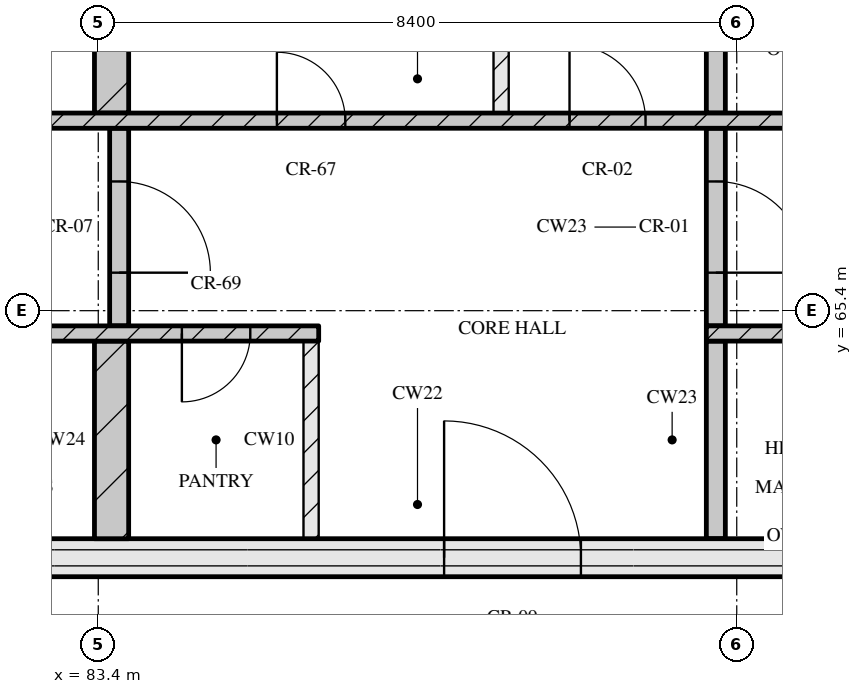
"""IFC4 building model, lengths in metres.
Left out: names, types, materials, properties, quantities, classifications, styles, units other than length and angle.
Written with IfcOpenShell. Run it as: python <this file> out.ifc"""

import sys

from ifc_helpers import new_model, si_unit, direction, frame, frame_2d, origin, place, context, subcontext, project, spatial, rectangle, extrude, element, fill, save


model = new_model("IFC4")
c1 = context("Model", 3, precision=1e-05, world=origin(), true_north=direction((0.0, 1.0)))
c2 = subcontext(c1, "Body", "Model", "MODEL_VIEW")
j1 = project(units=[si_unit("LENGTHUNIT", "METRE"), si_unit("PLANEANGLEUNIT", "RADIAN")], contexts=[c1])
p1 = place(None, origin())
s1 = spatial("IfcSite", under=j1, at=p1, CompositionType="ELEMENT")
p2 = place(p1, origin())
s2 = spatial("IfcBuilding", under=s1, at=p2, CompositionType="ELEMENT")
p3 = place(p2, frame((0.0, 0.0, 310.35)))
s3 = spatial("IfcBuildingStorey", under=s2, at=p3, CompositionType="ELEMENT", Elevation=310.35)
p4 = place(p3, frame((67.3, 62.15, 0.0), z_axis=(0.0, 0.0, 1.0), x_axis=(1.0, 0.0, 0.0)))
e1 = element("IfcWall", 1, at=p4, inside=s3, PredefinedType="SOLIDWALL", context=c2, shape_type="SweptSolid", body=[
    extrude(rectangle(XDim=40.6, YDim=0.5, at=frame_2d((20.3, 0.0))), origin(), (0.0, 0.0, 1.0), 4.2),
])
p5 = place(p4, frame((20.65, 0.0, 0.0)))
e2 = element("IfcOpeningElement", 2, at=p5, cuts=e1, PredefinedType="OPENING", context=c2, shape_type="SweptSolid", body=[
    extrude(rectangle(XDim=1.8, YDim=2.1, at=frame_2d((0.9, 1.05))), frame((0.0, 0.26, 0.0), z_axis=(0.0, -1.0, 0.0), x_axis=(1.0, 0.0, 0.0)), (0.0, 0.0, 1.0), 0.52),
])
p6 = place(p3, frame((83.575, 62.4, 0.0), z_axis=(0.0, 0.0, 1.0), x_axis=(0.0, 1.0, 0.0)))
e3 = element("IfcWall", 3, at=p6, inside=s3, PredefinedType="SOLIDWALL", context=c2, shape_type="SweptSolid", body=[
    extrude(rectangle(XDim=2.6, YDim=0.45, at=frame_2d((1.3, 0.0))), origin(), (0.0, 0.0, 1.0), 4.2),
])
p7 = place(p3, frame((86.2, 62.4, 0.0), z_axis=(0.0, 0.0, 1.0), x_axis=(0.0, 1.0, 0.0)))
e4 = element("IfcWall", 4, at=p7, inside=s3, PredefinedType="PARTITIONING", context=c2, shape_type="SweptSolid", body=[
    extrude(rectangle(XDim=2.6, YDim=0.2, at=frame_2d((1.3, 0.0))), origin(), (0.0, 0.0, 1.0), 4.2),
])
p8 = place(p3, frame((91.525, 62.4, 0.0), z_axis=(0.0, 0.0, 1.0), x_axis=(0.0, 1.0, 0.0)))
e5 = element("IfcWall", 5, at=p8, inside=s3, PredefinedType="SOLIDWALL", context=c2, shape_type="SweptSolid", body=[
    extrude(rectangle(XDim=2.6, YDim=0.25, at=frame_2d((1.3, 0.0))), origin(), (0.0, 0.0, 1.0), 4.2),
])
p9 = place(p3, frame((67.8, 65.1, 0.0), z_axis=(0.0, 0.0, 1.0), x_axis=(1.0, 0.0, 0.0)))
e6 = element("IfcWall", 6, at=p9, inside=s3, PredefinedType="SOLIDWALL", context=c2, shape_type="SweptSolid", body=[
    extrude(rectangle(XDim=18.5, YDim=0.2, at=frame_2d((9.25, 0.0))), origin(), (0.0, 0.0, 1.0), 4.2),
])
p10 = place(p9, frame((7.27, 0.0, 0.0)))
e7 = element("IfcOpeningElement", 7, at=p10, cuts=e6, PredefinedType="OPENING", context=c2, shape_type="SweptSolid", body=[
    extrude(rectangle(XDim=0.9, YDim=2.1, at=frame_2d((0.45, 1.05))), frame((0.0, 0.11, 0.0), z_axis=(0.0, -1.0, 0.0), x_axis=(1.0, 0.0, 0.0)), (0.0, 0.0, 1.0), 0.22),
])
p11 = place(p9, frame((8.95, 0.0, 0.0)))
e8 = element("IfcOpeningElement", 8, at=p11, cuts=e6, PredefinedType="OPENING", context=c2, shape_type="SweptSolid", body=[
    extrude(rectangle(XDim=0.9, YDim=2.1, at=frame_2d((0.45, 1.05))), frame((0.0, 0.11, 0.0), z_axis=(0.0, -1.0, 0.0), x_axis=(1.0, 0.0, 0.0)), (0.0, 0.0, 1.0), 0.22),
])
p12 = place(p9, frame((11.42, 0.0, 0.0)))
e9 = element("IfcOpeningElement", 9, at=p12, cuts=e6, PredefinedType="OPENING", context=c2, shape_type="SweptSolid", body=[
    extrude(rectangle(XDim=0.9, YDim=2.1, at=frame_2d((0.45, 1.05))), frame((0.0, 0.11, 0.0), z_axis=(0.0, -1.0, 0.0), x_axis=(1.0, 0.0, 0.0)), (0.0, 0.0, 1.0), 0.22),
])
p13 = place(p9, frame((13.92, 0.0, 0.0)))
e10 = element("IfcOpeningElement", 10, at=p13, cuts=e6, PredefinedType="OPENING", context=c2, shape_type="SweptSolid", body=[
    extrude(rectangle(XDim=0.9, YDim=2.1, at=frame_2d((0.45, 1.05))), frame((0.0, 0.11, 0.0), z_axis=(0.0, -1.0, 0.0), x_axis=(1.0, 0.0, 0.0)), (0.0, 0.0, 1.0), 0.22),
])
p14 = place(p9, frame((16.7, 0.0, 0.0)))
e11 = element("IfcOpeningElement", 11, at=p14, cuts=e6, PredefinedType="OPENING", context=c2, shape_type="SweptSolid", body=[
    extrude(rectangle(XDim=0.9, YDim=2.1, at=frame_2d((0.45, 1.05))), frame((0.0, 0.11, 0.0), z_axis=(0.0, -1.0, 0.0), x_axis=(1.0, 0.0, 0.0)), (0.0, 0.0, 1.0), 0.22),
])
p15 = place(p3, frame((91.4, 65.1, 0.0), z_axis=(0.0, 0.0, 1.0), x_axis=(1.0, 0.0, 0.0)))
e12 = element("IfcWall", 12, at=p15, inside=s3, PredefinedType="SOLIDWALL", context=c2, shape_type="SweptSolid", body=[
    extrude(rectangle(XDim=16.0, YDim=0.2, at=frame_2d((8.0, 0.0))), origin(), (0.0, 0.0, 1.0), 4.2),
])
p16 = place(p15, frame((7.83, 0.0, 0.0)))
e13 = element("IfcOpeningElement", 13, at=p16, cuts=e12, PredefinedType="OPENING", context=c2, shape_type="SweptSolid", body=[
    extrude(rectangle(XDim=0.9, YDim=2.1, at=frame_2d((0.45, 1.05))), frame((0.0, 0.11, 0.0), z_axis=(0.0, -1.0, 0.0), x_axis=(1.0, 0.0, 0.0)), (0.0, 0.0, 1.0), 0.22),
])
p17 = place(p3, frame((83.675, 65.2, 0.0), z_axis=(0.0, 0.0, 1.0), x_axis=(0.0, 1.0, 0.0)))
e14 = element("IfcWall", 14, at=p17, inside=s3, PredefinedType="SOLIDWALL", context=c2, shape_type="SweptSolid", body=[
    extrude(rectangle(XDim=2.6, YDim=0.25, at=frame_2d((1.3, 0.0))), origin(), (0.0, 0.0, 1.0), 4.2),
])
p18 = place(p17, frame((0.7, 0.0, 0.0)))
e15 = element("IfcOpeningElement", 15, at=p18, cuts=e14, PredefinedType="OPENING", context=c2, shape_type="SweptSolid", body=[
    extrude(rectangle(XDim=1.2, YDim=2.1, at=frame_2d((0.6, 1.05))), frame((0.0, 0.135, 0.0), z_axis=(0.0, -1.0, 0.0), x_axis=(1.0, 0.0, 0.0)), (0.0, 0.0, 1.0), 0.27),
])
p19 = place(p3, frame((91.525, 65.2, 0.0), z_axis=(0.0, 0.0, 1.0), x_axis=(0.0, 1.0, 0.0)))
e16 = element("IfcWall", 16, at=p19, inside=s3, PredefinedType="SOLIDWALL", context=c2, shape_type="SweptSolid", body=[
    extrude(rectangle(XDim=2.6, YDim=0.25, at=frame_2d((1.3, 0.0))), origin(), (0.0, 0.0, 1.0), 4.2),
])
p20 = place(p19, frame((0.7, 0.0, 0.0)))
e17 = element("IfcOpeningElement", 17, at=p20, cuts=e16, PredefinedType="OPENING", context=c2, shape_type="SweptSolid", body=[
    extrude(rectangle(XDim=1.2, YDim=2.1, at=frame_2d((0.6, 1.05))), frame((0.0, 0.135, 0.0), z_axis=(0.0, -1.0, 0.0), x_axis=(1.0, 0.0, 0.0)), (0.0, 0.0, 1.0), 0.27),
])
p21 = place(p3, frame((76.05, 67.9, 0.0), z_axis=(0.0, 0.0, 1.0), x_axis=(1.0, 0.0, 0.0)))
e18 = element("IfcWall", 18, at=p21, inside=s3, PredefinedType="SOLIDWALL", context=c2, shape_type="SweptSolid", body=[
    extrude(rectangle(XDim=23.1, YDim=0.2, at=frame_2d((11.55, 0.0))), origin(), (0.0, 0.0, 1.0), 4.2),
])
p22 = place(p21, frame((1.95, 0.0, 0.0)))
e19 = element("IfcOpeningElement", 19, at=p22, cuts=e18, PredefinedType="OPENING", context=c2, shape_type="SweptSolid", body=[
    extrude(rectangle(XDim=0.9, YDim=2.1, at=frame_2d((0.45, 1.05))), frame((0.0, 0.11, 0.0), z_axis=(0.0, -1.0, 0.0), x_axis=(1.0, 0.0, 0.0)), (0.0, 0.0, 1.0), 0.22),
])
p23 = place(p21, frame((5.66, 0.0, 0.0)))
e20 = element("IfcOpeningElement", 20, at=p23, cuts=e18, PredefinedType="OPENING", context=c2, shape_type="SweptSolid", body=[
    extrude(rectangle(XDim=0.9, YDim=2.1, at=frame_2d((0.45, 1.05))), frame((0.0, 0.11, 0.0), z_axis=(0.0, -1.0, 0.0), x_axis=(1.0, 0.0, 0.0)), (0.0, 0.0, 1.0), 0.22),
])
p24 = place(p21, frame((9.7, 0.0, 0.0)))
e21 = element("IfcOpeningElement", 21, at=p24, cuts=e18, PredefinedType="OPENING", context=c2, shape_type="SweptSolid", body=[
    extrude(rectangle(XDim=0.9, YDim=2.1, at=frame_2d((0.45, 1.05))), frame((0.0, 0.11, 0.0), z_axis=(0.0, -1.0, 0.0), x_axis=(1.0, 0.0, 0.0)), (0.0, 0.0, 1.0), 0.22),
])
p25 = place(p21, frame((13.55, 0.0, 0.0)))
e22 = element("IfcOpeningElement", 22, at=p25, cuts=e18, PredefinedType="OPENING", context=c2, shape_type="SweptSolid", body=[
    extrude(rectangle(XDim=1.0, YDim=2.1, at=frame_2d((0.5, 1.05))), frame((0.0, 0.11, 0.0), z_axis=(0.0, -1.0, 0.0), x_axis=(1.0, 0.0, 0.0)), (0.0, 0.0, 1.0), 0.22),
])
p26 = place(p3, frame((83.575, 68.0, 0.0), z_axis=(0.0, 0.0, 1.0), x_axis=(0.0, 1.0, 0.0)))
e23 = element("IfcWall", 23, at=p26, inside=s3, PredefinedType="SOLIDWALL", context=c2, shape_type="SweptSolid", body=[
    extrude(rectangle(XDim=2.6, YDim=0.45, at=frame_2d((1.3, 0.0))), origin(), (0.0, 0.0, 1.0), 4.2),
])
p27 = place(p3, frame((88.7, 68.0, 0.0), z_axis=(0.0, 0.0, 1.0), x_axis=(0.0, 1.0, 0.0)))
e24 = element("IfcWall", 24, at=p27, inside=s3, PredefinedType="PARTITIONING", context=c2, shape_type="SweptSolid", body=[
    extrude(rectangle(XDim=2.6, YDim=0.2, at=frame_2d((1.3, 0.0))), origin(), (0.0, 0.0, 1.0), 4.2),
])
p28 = place(p3, frame((91.525, 68.0, 0.0), z_axis=(0.0, 0.0, 1.0), x_axis=(0.0, 1.0, 0.0)))
e25 = element("IfcWall", 25, at=p28, inside=s3, PredefinedType="SOLIDWALL", context=c2, shape_type="SweptSolid", body=[
    extrude(rectangle(XDim=2.6, YDim=0.25, at=frame_2d((1.3, 0.0))), origin(), (0.0, 0.0, 1.0), 4.2),
])
p29 = place(p5, origin())
e26 = element("IfcDoor", 26, at=p29, inside=s3, OperationType="DOUBLE_DOOR_SINGLE_SWING", PredefinedType="DOOR", context=c2, shape_type="SweptSolid", body=[
    extrude(rectangle(XDim=1.8, YDim=2.1, at=frame_2d((0.9, 1.05))), frame((0.0, 0.025, 0.0), z_axis=(0.0, -1.0, 0.0), x_axis=(1.0, 0.0, 0.0)), (0.0, 0.0, 1.0), 0.05),
])
fill(e2, e26)
p30 = place(p14, origin())
e27 = element("IfcDoor", 27, at=p30, inside=s3, OperationType="SINGLE_SWING_RIGHT", PredefinedType="DOOR", context=c2, shape_type="SweptSolid", body=[
    extrude(rectangle(XDim=0.9, YDim=2.1, at=frame_2d((0.45, 1.05))), frame((0.0, 0.025, 0.0), z_axis=(0.0, -1.0, 0.0), x_axis=(1.0, 0.0, 0.0)), (0.0, 0.0, 1.0), 0.05),
])
fill(e11, e27)
p31 = place(p18, origin())
e28 = element("IfcDoor", 28, at=p31, inside=s3, OperationType="SINGLE_SWING_RIGHT", PredefinedType="DOOR", context=c2, shape_type="SweptSolid", body=[
    extrude(rectangle(XDim=1.2, YDim=2.1, at=frame_2d((0.6, 1.05))), frame((0.0, 0.025, 0.0), z_axis=(0.0, -1.0, 0.0), x_axis=(1.0, 0.0, 0.0)), (0.0, 0.0, 1.0), 0.05),
])
fill(e15, e28)
p32 = place(p20, origin())
e29 = element("IfcDoor", 29, at=p32, inside=s3, OperationType="SINGLE_SWING_RIGHT", PredefinedType="DOOR", context=c2, shape_type="SweptSolid", body=[
    extrude(rectangle(XDim=1.2, YDim=2.1, at=frame_2d((0.6, 1.05))), frame((0.0, 0.025, 0.0), z_axis=(0.0, -1.0, 0.0), x_axis=(1.0, 0.0, 0.0)), (0.0, 0.0, 1.0), 0.05),
])
fill(e17, e29)
p33 = place(p24, origin())
e30 = element("IfcDoor", 30, at=p33, inside=s3, OperationType="SINGLE_SWING_LEFT", PredefinedType="DOOR", context=c2, shape_type="SweptSolid", body=[
    extrude(rectangle(XDim=0.9, YDim=2.1, at=frame_2d((0.45, 1.05))), frame((0.0, 0.025, 0.0), z_axis=(0.0, -1.0, 0.0), x_axis=(1.0, 0.0, 0.0)), (0.0, 0.0, 1.0), 0.05),
])
fill(e21, e30)
p34 = place(p25, origin())
e31 = element("IfcDoor", 31, at=p34, inside=s3, OperationType="SINGLE_SWING_LEFT", PredefinedType="DOOR", context=c2, shape_type="SweptSolid", body=[
    extrude(rectangle(XDim=1.0, YDim=2.1, at=frame_2d((0.5, 1.05))), frame((0.0, 0.025, 0.0), z_axis=(0.0, -1.0, 0.0), x_axis=(1.0, 0.0, 0.0)), (0.0, 0.0, 1.0), 0.05),
])
fill(e22, e31)
save(model, sys.argv[1])
